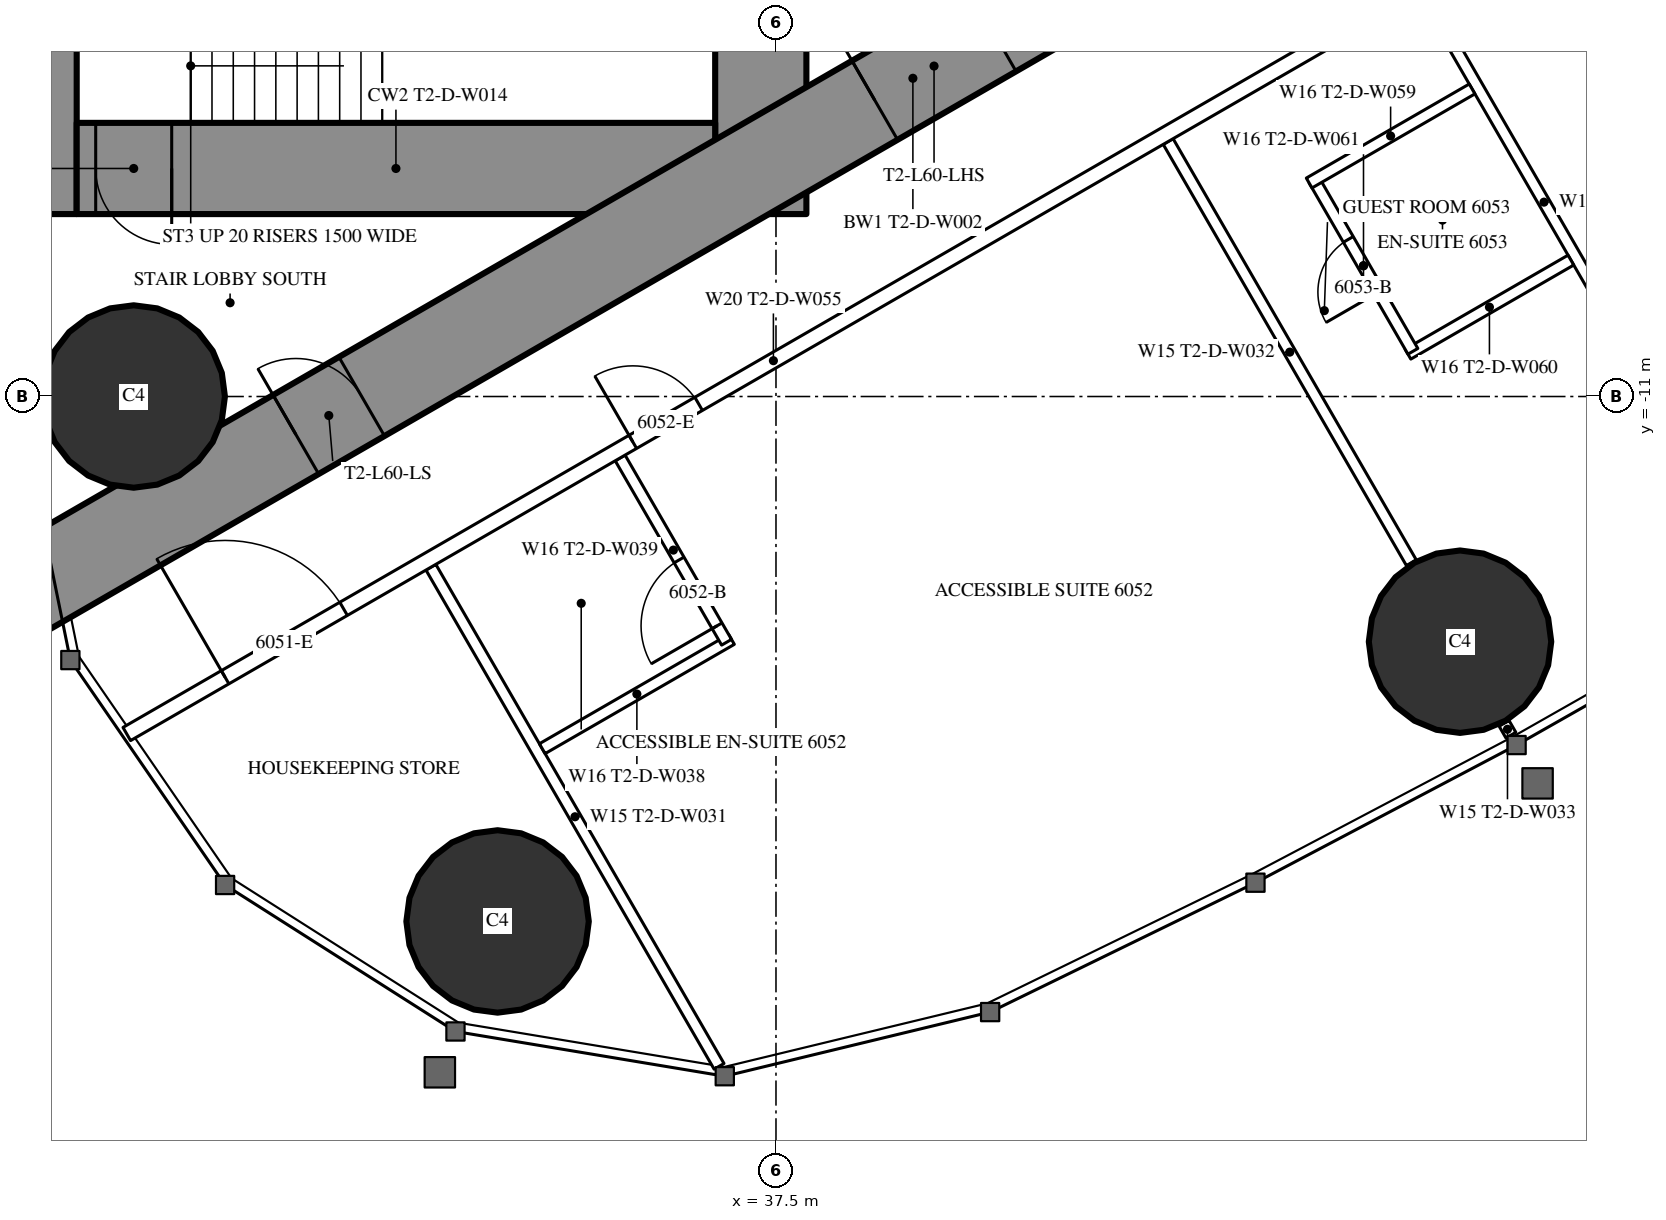
"""IFC4 building model, lengths in metres.
Left out: names, types, materials, properties, quantities, classifications, styles, units other than length and angle.
Written with IfcOpenShell. Run it as: python <this file> out.ifc"""

import sys

from ifc_helpers import new_model, si_unit, direction, frame, frame_2d, origin, origin_2d, place, context, subcontext, project, spatial, rectangle, circle, extrude, element, fill, save


model = new_model("IFC4")
c1 = context("Model", 3, precision=1e-05, world=origin(), true_north=direction((0.0, 1.0)))
c2 = subcontext(c1, "Body", "Model", "MODEL_VIEW")
j1 = project(units=[si_unit("LENGTHUNIT", "METRE"), si_unit("PLANEANGLEUNIT", "RADIAN")], contexts=[c1])
p1 = place(None, origin())
s1 = spatial("IfcSite", under=j1, at=p1, CompositionType="ELEMENT")
p2 = place(p1, origin())
s2 = spatial("IfcBuilding", under=s1, at=p2, CompositionType="ELEMENT")
p3 = place(p2, frame((0.0, 0.0, 226.1)))
s3 = spatial("IfcBuildingStorey", under=s2, at=p3, CompositionType="ELEMENT", Elevation=226.1)
for number, where, z_axis, x_axis in (
    (1, (33.837, -17.906, 0.0), (0.0, 0.0, 1.0), (1.0, 0.0, 0.0)),
    (2, (29.05, -11.0, 0.0), (0.0, 0.0, 1.0), (1.0, 0.0, 0.0)),
    (3, (46.499, -14.226, 0.0), (0.0, 0.0, 1.0), (1.0, 0.0, 0.0)),
):
    element("IfcColumn", number, at=place(p3, frame(where, z_axis=z_axis, x_axis=x_axis)), inside=s3, PredefinedType="COLUMN", context=c2, shape_type="SweptSolid", body=[
        extrude(circle(Radius=1.2, at=origin_2d()), origin(), (0.0, 0.0, 1.0), 3.6),
    ])
p4 = place(p3, frame((27.9, -8.6, 0.0), z_axis=(0.0, 0.0, 1.0), x_axis=(0.0, 1.0, 0.0)))
e4 = element("IfcWall", 4, at=p4, inside=s3, PredefinedType="SHEAR", context=c2, shape_type="SweptSolid", body=[
    extrude(rectangle(XDim=17.2, YDim=0.8, at=frame_2d((8.6, 0.0))), origin(), (0.0, 0.0, 1.0), 3.6),
])
p5 = place(p4, frame((9.35, 0.0, 0.0)))
e5 = element("IfcOpeningElement", 5, at=p5, cuts=e4, PredefinedType="OPENING", context=c2, shape_type="SweptSolid", body=[
    extrude(rectangle(XDim=0.9, YDim=2.2, at=frame_2d((0.45, 1.1))), frame((0.0, 0.41, 0.0), z_axis=(0.0, -1.0, 0.0), x_axis=(1.0, 0.0, 0.0)), (0.0, 0.0, 1.0), 0.82),
])
p6 = place(p3, frame((37.3, -8.6, 0.0), z_axis=(0.0, 0.0, 1.0), x_axis=(0.0, 1.0, 0.0)))
e6 = element("IfcWall", 6, at=p6, inside=s3, PredefinedType="SHEAR", context=c2, shape_type="SweptSolid", body=[
    extrude(rectangle(XDim=17.2, YDim=1.2, at=frame_2d((8.6, 0.0))), origin(), (0.0, 0.0, 1.0), 3.6),
])
p7 = place(p6, frame((7.7, 0.0, 0.0)))
e7 = element("IfcOpeningElement", 7, at=p7, cuts=e6, PredefinedType="OPENING", context=c2, shape_type="SweptSolid", body=[
    extrude(rectangle(XDim=1.8, YDim=2.2, at=frame_2d((0.9, 1.1))), frame((0.0, 0.61, 0.0), z_axis=(0.0, -1.0, 0.0), x_axis=(1.0, 0.0, 0.0)), (0.0, 0.0, 1.0), 1.22),
])
p8 = place(p3, frame((28.3, -8.0, 0.0), z_axis=(0.0, 0.0, 1.0), x_axis=(1.0, 0.0, 0.0)))
e8 = element("IfcWall", 8, at=p8, inside=s3, PredefinedType="SHEAR", context=c2, shape_type="SweptSolid", body=[
    extrude(rectangle(XDim=8.4, YDim=1.2, at=frame_2d((4.2, 0.0))), origin(), (0.0, 0.0, 1.0), 3.6),
])
p9 = place(p8, frame((0.25, 0.0, 0.0)))
e9 = element("IfcOpeningElement", 9, at=p9, cuts=e8, PredefinedType="OPENING", context=c2, shape_type="SweptSolid", body=[
    extrude(rectangle(XDim=1.0, YDim=2.2, at=frame_2d((0.5, 1.1))), frame((0.0, 0.61, 0.0), z_axis=(0.0, -1.0, 0.0), x_axis=(1.0, 0.0, 0.0)), (0.0, 0.0, 1.0), 1.22),
])
p10 = place(p3, frame((27.2, -13.8, 0.0), z_axis=(0.0, 0.0, 1.0), x_axis=(0.866027159892, 0.499996958321, 0.0)))
e10 = element("IfcWall", 10, at=p10, inside=s3, PredefinedType="SHEAR", context=c2, shape_type="SweptSolid", body=[
    extrude(rectangle(XDim=27.947, YDim=1.2, at=frame_2d((13.973, 0.0))), origin(), (0.0, 0.0, 1.0), 3.6),
])
p11 = place(p10, frame((4.6, 0.0, 0.0)))
e11 = element("IfcOpeningElement", 11, at=p11, cuts=e10, PredefinedType="OPENING", context=c2, shape_type="SweptSolid", body=[
    extrude(rectangle(XDim=1.0, YDim=2.2, at=frame_2d((0.5, 1.1))), frame((0.0, 0.61, 0.0), z_axis=(0.0, -1.0, 0.0), x_axis=(1.0, 0.0, 0.0)), (0.0, 0.0, 1.0), 1.22),
])
p12 = place(p10, frame((13.395, 0.0, 0.0)))
e12 = element("IfcOpeningElement", 12, at=p12, cuts=e10, PredefinedType="OPENING", context=c2, shape_type="SweptSolid", body=[
    extrude(rectangle(XDim=1.8, YDim=2.2, at=frame_2d((0.9, 1.1))), frame((0.0, 0.61, 0.0), z_axis=(0.0, -1.0, 0.0), x_axis=(1.0, 0.0, 0.0)), (0.0, 0.0, 1.0), 1.22),
])
p13 = place(p3, frame((32.96, -13.246, 0.0), z_axis=(0.0, 0.0, 1.0), x_axis=(0.500000236886, -0.866025267018, 0.0)))
e13 = element("IfcWall", 13, at=p13, inside=s3, PredefinedType="PARTITIONING", context=c2, shape_type="SweptSolid", body=[
    extrude(rectangle(XDim=7.583, YDim=0.15, at=frame_2d((3.791, 0.0))), origin(), (0.0, 0.0, 1.0), 3.35),
])
p14 = place(p3, frame((42.66, -7.646, 0.0), z_axis=(0.0, 0.0, 1.0), x_axis=(0.499996592859, -0.866027370889, 0.0)))
e14 = element("IfcWall", 14, at=p14, inside=s3, PredefinedType="PARTITIONING", context=c2, shape_type="SweptSolid", body=[
    extrude(rectangle(XDim=6.398, YDim=0.15, at=frame_2d((3.199, 0.0))), origin(), (0.0, 0.0, 1.0), 2.45),
])
p15 = place(p3, frame((47.079, -15.3, 0.0), z_axis=(0.0, 0.0, 1.0), x_axis=(0.499212083968, -0.866479829667, 0.0)))
e15 = element("IfcWall", 15, at=p15, inside=s3, PredefinedType="PARTITIONING", context=c2, shape_type="SweptSolid", body=[
    extrude(rectangle(XDim=0.179, YDim=0.15, at=frame_2d((0.09, 0.0))), origin(), (0.0, 0.0, 1.0), 2.45),
])
p16 = place(p3, frame((45.973, -5.617, 0.0), z_axis=(0.0, 0.0, 1.0), x_axis=(0.499985856986, -0.866033569104, 0.0)))
e16 = element("IfcWall", 16, at=p16, inside=s3, PredefinedType="PARTITIONING", context=c2, shape_type="SweptSolid", body=[
    extrude(rectangle(XDim=6.526, YDim=0.15, at=frame_2d((3.263, 0.0))), origin(), (0.0, 0.0, 1.0), 2.45),
])
p17 = place(p3, frame((34.425, -15.633, 0.0), z_axis=(0.0, 0.0, 1.0), x_axis=(0.866018712932, 0.500011588718, 0.0)))
e17 = element("IfcWall", 17, at=p17, inside=s3, PredefinedType="PARTITIONING", context=c2, shape_type="SweptSolid", body=[
    extrude(rectangle(XDim=2.875, YDim=0.15, at=frame_2d((1.438, 0.0))), origin(), (0.0, 0.0, 1.0), 3.35),
])
p18 = place(p3, frame((35.45, -11.808, 0.0), z_axis=(0.0, 0.0, 1.0), x_axis=(0.49994636267, -0.866056369097, 0.0)))
e18 = element("IfcWall", 18, at=p18, inside=s3, PredefinedType="PARTITIONING", context=c2, shape_type="SweptSolid", body=[
    extrude(rectangle(XDim=2.8, YDim=0.15, at=frame_2d((1.4, 0.0))), origin(), (0.0, 0.0, 1.0), 3.35),
])
p19 = place(p18, frame((1.55, 0.0, 0.0)))
e19 = element("IfcOpeningElement", 19, at=p19, cuts=e18, PredefinedType="OPENING", context=c2, shape_type="SweptSolid", body=[
    extrude(rectangle(XDim=1.0, YDim=2.2, at=frame_2d((0.5, 1.1))), frame((0.0, 0.085, 0.0), z_axis=(0.0, -1.0, 0.0), x_axis=(1.0, 0.0, 0.0)), (0.0, 0.0, 1.0), 0.17),
])
p20 = place(p3, frame((45.814, -10.443, 0.0), z_axis=(0.0, 0.0, 1.0), x_axis=(0.866073894602, 0.499916002032, 0.0)))
e20 = element("IfcWall", 20, at=p20, inside=s3, PredefinedType="PARTITIONING", context=c2, shape_type="SweptSolid", body=[
    extrude(rectangle(XDim=2.475, YDim=0.15, at=frame_2d((1.238, 0.0))), origin(), (0.0, 0.0, 1.0), 3.35),
])
p21 = place(p3, frame((44.579, -8.154, 0.0), z_axis=(0.0, 0.0, 1.0), x_axis=(0.500006934395, -0.866021400173, 0.0)))
e21 = element("IfcWall", 21, at=p21, inside=s3, PredefinedType="PARTITIONING", context=c2, shape_type="SweptSolid", body=[
    extrude(rectangle(XDim=2.6, YDim=0.15, at=frame_2d((1.3, 0.0))), origin(), (0.0, 0.0, 1.0), 3.35),
])
p22 = place(p21, frame((0.9, 0.0, 0.0)))
e22 = element("IfcOpeningElement", 22, at=p22, cuts=e21, PredefinedType="OPENING", context=c2, shape_type="SweptSolid", body=[
    extrude(rectangle(XDim=0.8, YDim=2.2, at=frame_2d((0.4, 1.1))), frame((0.0, 0.085, 0.0), z_axis=(0.0, -1.0, 0.0), x_axis=(1.0, 0.0, 0.0)), (0.0, 0.0, 1.0), 0.17),
])
p23 = place(p3, frame((44.514, -8.191, 0.0), z_axis=(0.0, 0.0, 1.0), x_axis=(0.866031185235, 0.4999899861, 0.0)))
e23 = element("IfcWall", 23, at=p23, inside=s3, PredefinedType="PARTITIONING", context=c2, shape_type="SweptSolid", body=[
    extrude(rectangle(XDim=2.475, YDim=0.15, at=frame_2d((1.238, 0.0))), origin(), (0.0, 0.0, 1.0), 3.35),
])
p24 = place(p3, frame((28.959, -15.44, 0.0), z_axis=(0.0, 0.0, 1.0), x_axis=(0.866025204199, 0.500000345692, 0.0)))
e24 = element("IfcWall", 24, at=p24, inside=s3, PredefinedType="PARTITIONING", context=c2, shape_type="SweptSolid", body=[
    extrude(rectangle(XDim=19.646, YDim=0.2, at=frame_2d((9.823, 0.0))), origin(), (0.0, 0.0, 1.0), 3.35),
])
p25 = place(p24, frame((1.494, 0.0, 0.0)))
e25 = element("IfcOpeningElement", 25, at=p25, cuts=e24, PredefinedType="OPENING", context=c2, shape_type="SweptSolid", body=[
    extrude(rectangle(XDim=1.8, YDim=2.04, at=frame_2d((0.9, 1.02))), frame((0.0, 0.11, 0.0), z_axis=(0.0, -1.0, 0.0), x_axis=(1.0, 0.0, 0.0)), (0.0, 0.0, 1.0), 0.22),
])
p26 = place(p24, frame((7.687, 0.0, 0.0)))
e26 = element("IfcOpeningElement", 26, at=p26, cuts=e24, PredefinedType="OPENING", context=c2, shape_type="SweptSolid", body=[
    extrude(rectangle(XDim=1.0, YDim=2.2, at=frame_2d((0.5, 1.1))), frame((0.0, 0.11, 0.0), z_axis=(0.0, -1.0, 0.0), x_axis=(1.0, 0.0, 0.0)), (0.0, 0.0, 1.0), 0.22),
])
p27 = place(p24, frame((18.321, 0.0, 0.0)))
e27 = element("IfcOpeningElement", 27, at=p27, cuts=e24, PredefinedType="OPENING", context=c2, shape_type="SweptSolid", body=[
    extrude(rectangle(XDim=0.95, YDim=2.2, at=frame_2d((0.475, 1.1))), frame((0.0, 0.11, 0.0), z_axis=(0.0, -1.0, 0.0), x_axis=(1.0, 0.0, 0.0)), (0.0, 0.0, 1.0), 0.22),
])
p28 = place(p25, origin())
e28 = element("IfcDoor", 28, at=p28, inside=s3, OperationType="DOUBLE_DOOR_SINGLE_SWING", PredefinedType="DOOR", context=c2, shape_type="SweptSolid", body=[
    extrude(rectangle(XDim=1.8, YDim=2.04, at=frame_2d((0.9, 1.02))), frame((0.0, 0.025, 0.0), z_axis=(0.0, -1.0, 0.0), x_axis=(1.0, 0.0, 0.0)), (0.0, 0.0, 1.0), 0.05),
])
fill(e25, e28)
p29 = place(p19, origin())
e29 = element("IfcDoor", 29, at=p29, inside=s3, OperationType="SINGLE_SWING_RIGHT", PredefinedType="DOOR", context=c2, shape_type="SweptSolid", body=[
    extrude(rectangle(XDim=1.0, YDim=2.2, at=frame_2d((0.5, 1.1))), frame((0.0, 0.025, 0.0), z_axis=(0.0, -1.0, 0.0), x_axis=(1.0, 0.0, 0.0)), (0.0, 0.0, 1.0), 0.05),
])
fill(e19, e29)
p30 = place(p26, origin())
e30 = element("IfcDoor", 30, at=p30, inside=s3, OperationType="SINGLE_SWING_LEFT", PredefinedType="DOOR", context=c2, shape_type="SweptSolid", body=[
    extrude(rectangle(XDim=1.0, YDim=2.2, at=frame_2d((0.5, 1.1))), frame((0.0, 0.025, 0.0), z_axis=(0.0, -1.0, 0.0), x_axis=(1.0, 0.0, 0.0)), (0.0, 0.0, 1.0), 0.05),
])
fill(e26, e30)
p31 = place(p22, origin())
e31 = element("IfcDoor", 31, at=p31, inside=s3, OperationType="SINGLE_SWING_RIGHT", PredefinedType="DOOR", context=c2, shape_type="SweptSolid", body=[
    extrude(rectangle(XDim=0.8, YDim=2.2, at=frame_2d((0.4, 1.1))), frame((0.0, 0.025, 0.0), z_axis=(0.0, -1.0, 0.0), x_axis=(1.0, 0.0, 0.0)), (0.0, 0.0, 1.0), 0.05),
])
fill(e22, e31)
p32 = place(p11, origin())
e32 = element("IfcDoor", 32, at=p32, inside=s3, OperationType="SINGLE_SWING_LEFT", PredefinedType="DOOR", context=c2, shape_type="SweptSolid", body=[
    extrude(rectangle(XDim=1.0, YDim=2.2, at=frame_2d((0.5, 1.1))), frame((0.0, 0.025, 0.0), z_axis=(0.0, -1.0, 0.0), x_axis=(1.0, 0.0, 0.0)), (0.0, 0.0, 1.0), 0.05),
])
fill(e11, e32)
p33 = place(p12, origin())
e33 = element("IfcDoor", 33, at=p33, inside=s3, OperationType="DOUBLE_DOOR_SINGLE_SWING", PredefinedType="DOOR", context=c2, shape_type="SweptSolid", body=[
    extrude(rectangle(XDim=1.8, YDim=2.2, at=frame_2d((0.9, 1.1))), frame((0.0, 0.025, 0.0), z_axis=(0.0, -1.0, 0.0), x_axis=(1.0, 0.0, 0.0)), (0.0, 0.0, 1.0), 0.05),
])
fill(e12, e33)
p34 = place(p9, origin())
e34 = element("IfcDoor", 34, at=p34, inside=s3, OperationType="SINGLE_SWING_RIGHT", PredefinedType="DOOR", context=c2, shape_type="SweptSolid", body=[
    extrude(rectangle(XDim=1.0, YDim=2.2, at=frame_2d((0.5, 1.1))), frame((0.0, 0.025, 0.0), z_axis=(0.0, -1.0, 0.0), x_axis=(1.0, 0.0, 0.0)), (0.0, 0.0, 1.0), 0.05),
])
fill(e9, e34)
save(model, sys.argv[1])
